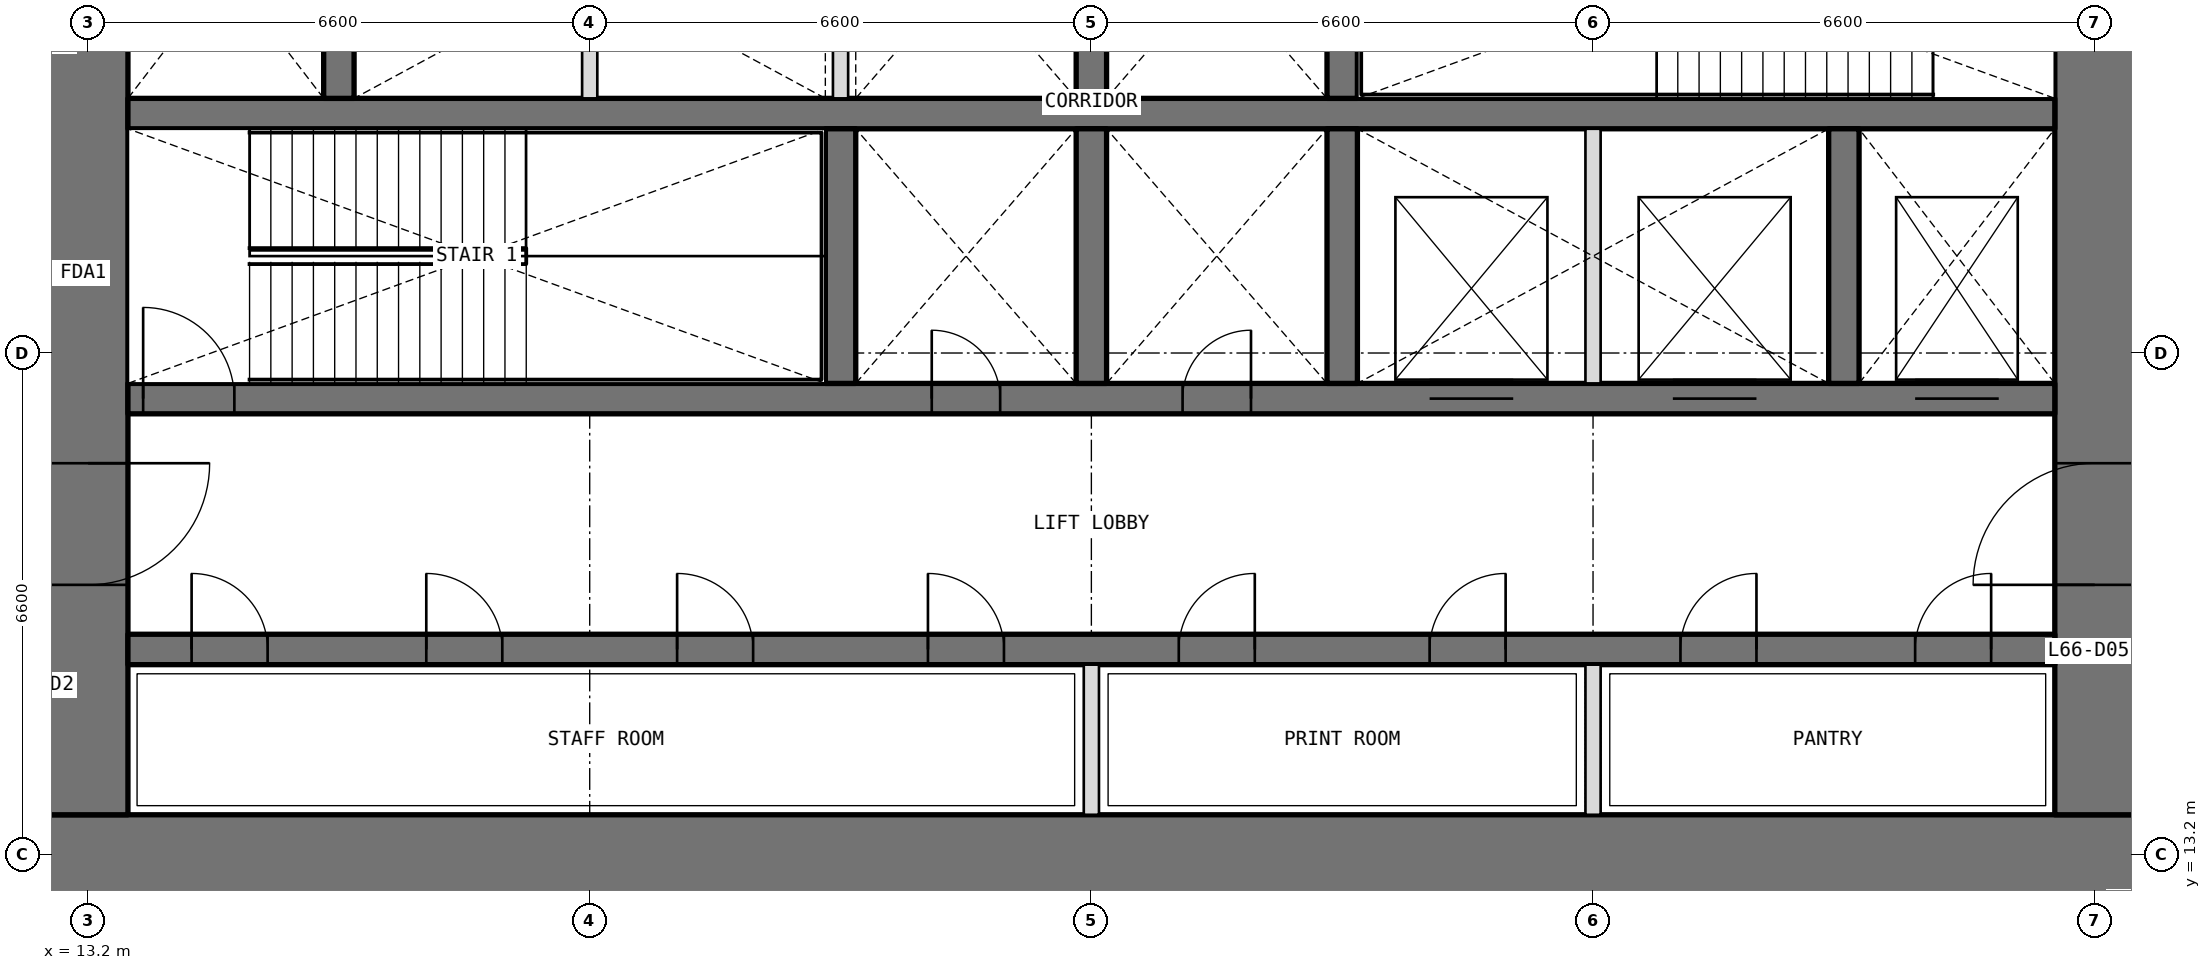
"""IFC4 building model, lengths in metres.
Left out: names, types, materials, properties, quantities, classifications, styles, units other than length and angle.
Written with IfcOpenShell. Run it as: python <this file> out.ifc"""

import sys

from ifc_helpers import new_model, si_unit, direction, frame, frame_2d, origin, place, context, subcontext, project, spatial, rectangle, extrude, element, fill, save


model = new_model("IFC4")
c1 = context("Model", 3, precision=1e-05, world=origin(), true_north=direction((0.0, 1.0)))
c2 = subcontext(c1, "Body", "Model", "MODEL_VIEW")
j1 = project(units=[si_unit("LENGTHUNIT", "METRE"), si_unit("PLANEANGLEUNIT", "RADIAN")], contexts=[c1])
p1 = place(None, origin())
s1 = spatial("IfcSite", under=j1, at=p1, CompositionType="ELEMENT")
p2 = place(p1, origin())
s2 = spatial("IfcBuilding", under=s1, at=p2, CompositionType="ELEMENT")
p3 = place(p2, frame((0.0, 0.0, 288.0)))
s3 = spatial("IfcBuildingStorey", under=s2, at=p3, CompositionType="ELEMENT", Elevation=288.0)
p4 = place(p3, frame((12.675, 13.2, 0.0), z_axis=(0.0, 0.0, 1.0), x_axis=(1.0, 0.0, 0.0)))
e1 = element("IfcWall", 1, at=p4, inside=s3, PredefinedType="SHEAR", context=c2, shape_type="SweptSolid", body=[
    extrude(rectangle(XDim=27.45, YDim=1.05, at=frame_2d((13.725, 0.0))), origin(), (0.0, 0.0, 1.0), 4.8),
])
p5 = place(p3, frame((39.6, 13.725, 0.0), z_axis=(0.0, 0.0, 1.0), x_axis=(0.0, 1.0, 0.0)))
e2 = element("IfcWall", 2, at=p5, inside=s3, PredefinedType="SHEAR", context=c2, shape_type="SweptSolid", body=[
    extrude(rectangle(XDim=18.75, YDim=1.05, at=frame_2d((9.375, 0.0))), origin(), (0.0, 0.0, 1.0), 4.8),
])
p6 = place(p5, frame((3.025, 0.0, 0.0)))
e3 = element("IfcOpeningElement", 3, at=p6, cuts=e2, PredefinedType="OPENING", context=c2, shape_type="SweptSolid", body=[
    extrude(rectangle(XDim=1.6, YDim=2.1, at=frame_2d((0.8, 1.05))), frame((0.0, 0.535, 0.0), z_axis=(0.0, -1.0, 0.0), x_axis=(1.0, 0.0, 0.0)), (0.0, 0.0, 1.0), 1.07),
])
p7 = place(p5, frame((13.825, 0.0, 0.0)))
e4 = element("IfcOpeningElement", 4, at=p7, cuts=e2, PredefinedType="OPENING", context=c2, shape_type="SweptSolid", body=[
    extrude(rectangle(XDim=1.6, YDim=2.1, at=frame_2d((0.8, 1.05))), frame((0.0, 0.535, 0.0), z_axis=(0.0, -1.0, 0.0), x_axis=(1.0, 0.0, 0.0)), (0.0, 0.0, 1.0), 1.07),
])
p8 = place(p3, frame((13.2, 32.475, 0.0), z_axis=(0.0, 0.0, 1.0), x_axis=(0.0, -1.0, 0.0)))
e5 = element("IfcWall", 5, at=p8, inside=s3, PredefinedType="SHEAR", context=c2, shape_type="SweptSolid", body=[
    extrude(rectangle(XDim=18.75, YDim=1.05, at=frame_2d((9.375, 0.0))), origin(), (0.0, 0.0, 1.0), 4.8),
])
p9 = place(p8, frame((14.125, 0.0, 0.0)))
e6 = element("IfcOpeningElement", 6, at=p9, cuts=e5, PredefinedType="OPENING", context=c2, shape_type="SweptSolid", body=[
    extrude(rectangle(XDim=1.6, YDim=2.1, at=frame_2d((0.8, 1.05))), frame((0.0, 0.535, 0.0), z_axis=(0.0, -1.0, 0.0), x_axis=(1.0, 0.0, 0.0)), (0.0, 0.0, 1.0), 1.07),
])
p10 = place(p8, frame((3.325, 0.0, 0.0)))
e7 = element("IfcOpeningElement", 7, at=p10, cuts=e5, PredefinedType="OPENING", context=c2, shape_type="SweptSolid", body=[
    extrude(rectangle(XDim=1.6, YDim=2.1, at=frame_2d((0.8, 1.05))), frame((0.0, 0.535, 0.0), z_axis=(0.0, -1.0, 0.0), x_axis=(1.0, 0.0, 0.0)), (0.0, 0.0, 1.0), 1.07),
])
p11 = place(p3, frame((13.725, 15.9, 0.0), z_axis=(0.0, 0.0, 1.0), x_axis=(1.0, 0.0, 0.0)))
e8 = element("IfcWall", 8, at=p11, inside=s3, PredefinedType="SHEAR", context=c2, shape_type="SweptSolid", body=[
    extrude(rectangle(XDim=25.35, YDim=0.4, at=frame_2d((12.675, 0.0))), origin(), (0.0, 0.0, 1.0), 4.8),
])
p12 = place(p11, frame((0.837, 0.0, 0.0)))
e9 = element("IfcOpeningElement", 9, at=p12, cuts=e8, PredefinedType="OPENING", context=c2, shape_type="SweptSolid", body=[
    extrude(rectangle(XDim=1.0, YDim=2.1, at=frame_2d((0.5, 1.05))), frame((0.0, 0.21, 0.0), z_axis=(0.0, -1.0, 0.0), x_axis=(1.0, 0.0, 0.0)), (0.0, 0.0, 1.0), 0.42),
])
p13 = place(p11, frame((3.925, 0.0, 0.0)))
e10 = element("IfcOpeningElement", 10, at=p13, cuts=e8, PredefinedType="OPENING", context=c2, shape_type="SweptSolid", body=[
    extrude(rectangle(XDim=1.0, YDim=2.1, at=frame_2d((0.5, 1.05))), frame((0.0, 0.21, 0.0), z_axis=(0.0, -1.0, 0.0), x_axis=(1.0, 0.0, 0.0)), (0.0, 0.0, 1.0), 0.42),
])
p14 = place(p11, frame((7.225, 0.0, 0.0)))
e11 = element("IfcOpeningElement", 11, at=p14, cuts=e8, PredefinedType="OPENING", context=c2, shape_type="SweptSolid", body=[
    extrude(rectangle(XDim=1.0, YDim=2.1, at=frame_2d((0.5, 1.05))), frame((0.0, 0.21, 0.0), z_axis=(0.0, -1.0, 0.0), x_axis=(1.0, 0.0, 0.0)), (0.0, 0.0, 1.0), 0.42),
])
p15 = place(p11, frame((10.525, 0.0, 0.0)))
e12 = element("IfcOpeningElement", 12, at=p15, cuts=e8, PredefinedType="OPENING", context=c2, shape_type="SweptSolid", body=[
    extrude(rectangle(XDim=1.0, YDim=2.1, at=frame_2d((0.5, 1.05))), frame((0.0, 0.21, 0.0), z_axis=(0.0, -1.0, 0.0), x_axis=(1.0, 0.0, 0.0)), (0.0, 0.0, 1.0), 0.42),
])
p16 = place(p11, frame((13.825, 0.0, 0.0)))
e13 = element("IfcOpeningElement", 13, at=p16, cuts=e8, PredefinedType="OPENING", context=c2, shape_type="SweptSolid", body=[
    extrude(rectangle(XDim=1.0, YDim=2.1, at=frame_2d((0.5, 1.05))), frame((0.0, 0.21, 0.0), z_axis=(0.0, -1.0, 0.0), x_axis=(1.0, 0.0, 0.0)), (0.0, 0.0, 1.0), 0.42),
])
p17 = place(p11, frame((17.125, 0.0, 0.0)))
e14 = element("IfcOpeningElement", 14, at=p17, cuts=e8, PredefinedType="OPENING", context=c2, shape_type="SweptSolid", body=[
    extrude(rectangle(XDim=1.0, YDim=2.1, at=frame_2d((0.5, 1.05))), frame((0.0, 0.21, 0.0), z_axis=(0.0, -1.0, 0.0), x_axis=(1.0, 0.0, 0.0)), (0.0, 0.0, 1.0), 0.42),
])
p18 = place(p11, frame((20.425, 0.0, 0.0)))
e15 = element("IfcOpeningElement", 15, at=p18, cuts=e8, PredefinedType="OPENING", context=c2, shape_type="SweptSolid", body=[
    extrude(rectangle(XDim=1.0, YDim=2.1, at=frame_2d((0.5, 1.05))), frame((0.0, 0.21, 0.0), z_axis=(0.0, -1.0, 0.0), x_axis=(1.0, 0.0, 0.0)), (0.0, 0.0, 1.0), 0.42),
])
p19 = place(p11, frame((23.512, 0.0, 0.0)))
e16 = element("IfcOpeningElement", 16, at=p19, cuts=e8, PredefinedType="OPENING", context=c2, shape_type="SweptSolid", body=[
    extrude(rectangle(XDim=1.0, YDim=2.1, at=frame_2d((0.5, 1.05))), frame((0.0, 0.21, 0.0), z_axis=(0.0, -1.0, 0.0), x_axis=(1.0, 0.0, 0.0)), (0.0, 0.0, 1.0), 0.42),
])
p20 = place(p3, frame((13.725, 19.2, 0.0), z_axis=(0.0, 0.0, 1.0), x_axis=(1.0, 0.0, 0.0)))
e17 = element("IfcWall", 17, at=p20, inside=s3, PredefinedType="SHEAR", context=c2, shape_type="SweptSolid", body=[
    extrude(rectangle(XDim=25.35, YDim=0.4, at=frame_2d((12.675, 0.0))), origin(), (0.0, 0.0, 1.0), 4.8),
])
p21 = place(p20, frame((10.575, 0.0, 0.0)))
e18 = element("IfcOpeningElement", 18, at=p21, cuts=e17, PredefinedType="OPENING", context=c2, shape_type="SweptSolid", body=[
    extrude(rectangle(XDim=0.9, YDim=2.1, at=frame_2d((0.45, 1.05))), frame((0.0, 0.21, 0.0), z_axis=(0.0, -1.0, 0.0), x_axis=(1.0, 0.0, 0.0)), (0.0, 0.0, 1.0), 0.42),
])
p22 = place(p20, frame((13.875, 0.0, 0.0)))
e19 = element("IfcOpeningElement", 19, at=p22, cuts=e17, PredefinedType="OPENING", context=c2, shape_type="SweptSolid", body=[
    extrude(rectangle(XDim=0.9, YDim=2.1, at=frame_2d((0.45, 1.05))), frame((0.0, 0.21, 0.0), z_axis=(0.0, -1.0, 0.0), x_axis=(1.0, 0.0, 0.0)), (0.0, 0.0, 1.0), 0.42),
])
p23 = place(p20, frame((0.2, 0.0, 0.0)))
e20 = element("IfcOpeningElement", 20, at=p23, cuts=e17, PredefinedType="OPENING", context=c2, shape_type="SweptSolid", body=[
    extrude(rectangle(XDim=1.2, YDim=2.1, at=frame_2d((0.6, 1.05))), frame((0.0, 0.21, 0.0), z_axis=(0.0, -1.0, 0.0), x_axis=(1.0, 0.0, 0.0)), (0.0, 0.0, 1.0), 0.42),
])
p24 = place(p20, frame((23.512, 0.0, 0.0)))
e21 = element("IfcOpeningElement", 21, at=p24, cuts=e17, PredefinedType="OPENING", context=c2, shape_type="SweptSolid", body=[
    extrude(rectangle(XDim=1.1, YDim=2.1, at=frame_2d((0.55, 1.05))), frame((0.0, 0.21, 0.0), z_axis=(0.0, -1.0, 0.0), x_axis=(1.0, 0.0, 0.0)), (0.0, 0.0, 1.0), 0.42),
])
p25 = place(p20, frame((17.125, 0.0, 0.0)))
e22 = element("IfcOpeningElement", 22, at=p25, cuts=e17, PredefinedType="OPENING", context=c2, shape_type="SweptSolid", body=[
    extrude(rectangle(XDim=1.1, YDim=2.1, at=frame_2d((0.55, 1.05))), frame((0.0, 0.21, 0.0), z_axis=(0.0, -1.0, 0.0), x_axis=(1.0, 0.0, 0.0)), (0.0, 0.0, 1.0), 0.42),
])
p26 = place(p20, frame((20.325, 0.0, 0.0)))
e23 = element("IfcOpeningElement", 23, at=p26, cuts=e17, PredefinedType="OPENING", context=c2, shape_type="SweptSolid", body=[
    extrude(rectangle(XDim=1.1, YDim=2.1, at=frame_2d((0.55, 1.05))), frame((0.0, 0.21, 0.0), z_axis=(0.0, -1.0, 0.0), x_axis=(1.0, 0.0, 0.0)), (0.0, 0.0, 1.0), 0.42),
])
p27 = place(p3, frame((13.725, 22.95, 0.0), z_axis=(0.0, 0.0, 1.0), x_axis=(1.0, 0.0, 0.0)))
e24 = element("IfcWall", 24, at=p27, inside=s3, PredefinedType="SHEAR", context=c2, shape_type="SweptSolid", body=[
    extrude(rectangle(XDim=25.35, YDim=0.4, at=frame_2d((12.675, 0.0))), origin(), (0.0, 0.0, 1.0), 4.8),
])
for number, where, z_axis, x_axis in (
    (25, (23.1, 19.4, 0.0), (0.0, 0.0, 1.0), (0.0, 1.0, 0.0)),
    (26, (26.4, 19.4, 0.0), (0.0, 0.0, 1.0), (0.0, 1.0, 0.0)),
    (27, (29.7, 19.4, 0.0), (0.0, 0.0, 1.0), (0.0, 1.0, 0.0)),
    (28, (36.3, 19.4, 0.0), (0.0, 0.0, 1.0), (0.0, 1.0, 0.0)),
    (29, (16.5, 23.15, 0.0), (0.0, 0.0, 1.0), (0.0, 1.0, 0.0)),
    (30, (26.4, 23.15, 0.0), (0.0, 0.0, 1.0), (0.0, 1.0, 0.0)),
    (31, (29.7, 23.15, 0.0), (0.0, 0.0, 1.0), (0.0, 1.0, 0.0)),
):
    element("IfcWall", number, at=place(p3, frame(where, z_axis=z_axis, x_axis=x_axis)), inside=s3, PredefinedType="SHEAR", context=c2, shape_type="SweptSolid", body=[
        extrude(rectangle(XDim=3.35, YDim=0.4, at=frame_2d((1.675, 0.0))), origin(), (0.0, 0.0, 1.0), 4.8),
    ])
for number, where, z_axis, x_axis in (
    (32, (26.4, 13.725, 0.0), (0.0, 0.0, 1.0), (0.0, 1.0, 0.0)),
    (33, (33.0, 13.725, 0.0), (0.0, 0.0, 1.0), (0.0, 1.0, 0.0)),
):
    element("IfcWall", number, at=place(p3, frame(where, z_axis=z_axis, x_axis=x_axis)), inside=s3, PredefinedType="PARTITIONING", context=c2, shape_type="SweptSolid", body=[
        extrude(rectangle(XDim=1.975, YDim=0.2, at=frame_2d((0.987, 0.0))), origin(), (0.0, 0.0, 1.0), 4.8),
    ])
for number, where, z_axis, x_axis in (
    (34, (33.0, 19.4, 0.0), (0.0, 0.0, 1.0), (0.0, 1.0, 0.0)),
    (35, (19.8, 23.15, 0.0), (0.0, 0.0, 1.0), (0.0, 1.0, 0.0)),
    (36, (23.1, 23.15, 0.0), (0.0, 0.0, 1.0), (0.0, 1.0, 0.0)),
):
    element("IfcWall", number, at=place(p3, frame(where, z_axis=z_axis, x_axis=x_axis)), inside=s3, PredefinedType="PARTITIONING", context=c2, shape_type="SweptSolid", body=[
        extrude(rectangle(XDim=3.35, YDim=0.2, at=frame_2d((1.675, 0.0))), origin(), (0.0, 0.0, 1.0), 4.8),
    ])
p28 = place(p21, origin())
e37 = element("IfcDoor", 37, at=p28, inside=s3, OperationType="SINGLE_SWING_LEFT", PredefinedType="DOOR", context=c2, shape_type="SweptSolid", body=[
    extrude(rectangle(XDim=0.9, YDim=2.1, at=frame_2d((0.45, 1.05))), frame((0.0, 0.025, 0.0), z_axis=(0.0, -1.0, 0.0), x_axis=(1.0, 0.0, 0.0)), (0.0, 0.0, 1.0), 0.05),
])
fill(e18, e37)
p29 = place(p22, origin())
e38 = element("IfcDoor", 38, at=p29, inside=s3, OperationType="SINGLE_SWING_RIGHT", PredefinedType="DOOR", context=c2, shape_type="SweptSolid", body=[
    extrude(rectangle(XDim=0.9, YDim=2.1, at=frame_2d((0.45, 1.05))), frame((0.0, 0.025, 0.0), z_axis=(0.0, -1.0, 0.0), x_axis=(1.0, 0.0, 0.0)), (0.0, 0.0, 1.0), 0.05),
])
fill(e19, e38)
p30 = place(p12, origin())
e39 = element("IfcDoor", 39, at=p30, inside=s3, OperationType="SINGLE_SWING_LEFT", PredefinedType="DOOR", context=c2, shape_type="SweptSolid", body=[
    extrude(rectangle(XDim=1.0, YDim=2.1, at=frame_2d((0.5, 1.05))), frame((0.0, 0.025, 0.0), z_axis=(0.0, -1.0, 0.0), x_axis=(1.0, 0.0, 0.0)), (0.0, 0.0, 1.0), 0.05),
])
fill(e9, e39)
p31 = place(p13, origin())
e40 = element("IfcDoor", 40, at=p31, inside=s3, OperationType="SINGLE_SWING_LEFT", PredefinedType="DOOR", context=c2, shape_type="SweptSolid", body=[
    extrude(rectangle(XDim=1.0, YDim=2.1, at=frame_2d((0.5, 1.05))), frame((0.0, 0.025, 0.0), z_axis=(0.0, -1.0, 0.0), x_axis=(1.0, 0.0, 0.0)), (0.0, 0.0, 1.0), 0.05),
])
fill(e10, e40)
p32 = place(p14, origin())
e41 = element("IfcDoor", 41, at=p32, inside=s3, OperationType="SINGLE_SWING_LEFT", PredefinedType="DOOR", context=c2, shape_type="SweptSolid", body=[
    extrude(rectangle(XDim=1.0, YDim=2.1, at=frame_2d((0.5, 1.05))), frame((0.0, 0.025, 0.0), z_axis=(0.0, -1.0, 0.0), x_axis=(1.0, 0.0, 0.0)), (0.0, 0.0, 1.0), 0.05),
])
fill(e11, e41)
p33 = place(p15, origin())
e42 = element("IfcDoor", 42, at=p33, inside=s3, OperationType="SINGLE_SWING_LEFT", PredefinedType="DOOR", context=c2, shape_type="SweptSolid", body=[
    extrude(rectangle(XDim=1.0, YDim=2.1, at=frame_2d((0.5, 1.05))), frame((0.0, 0.025, 0.0), z_axis=(0.0, -1.0, 0.0), x_axis=(1.0, 0.0, 0.0)), (0.0, 0.0, 1.0), 0.05),
])
fill(e12, e42)
p34 = place(p16, origin())
e43 = element("IfcDoor", 43, at=p34, inside=s3, OperationType="SINGLE_SWING_RIGHT", PredefinedType="DOOR", context=c2, shape_type="SweptSolid", body=[
    extrude(rectangle(XDim=1.0, YDim=2.1, at=frame_2d((0.5, 1.05))), frame((0.0, 0.025, 0.0), z_axis=(0.0, -1.0, 0.0), x_axis=(1.0, 0.0, 0.0)), (0.0, 0.0, 1.0), 0.05),
])
fill(e13, e43)
p35 = place(p17, origin())
e44 = element("IfcDoor", 44, at=p35, inside=s3, OperationType="SINGLE_SWING_RIGHT", PredefinedType="DOOR", context=c2, shape_type="SweptSolid", body=[
    extrude(rectangle(XDim=1.0, YDim=2.1, at=frame_2d((0.5, 1.05))), frame((0.0, 0.025, 0.0), z_axis=(0.0, -1.0, 0.0), x_axis=(1.0, 0.0, 0.0)), (0.0, 0.0, 1.0), 0.05),
])
fill(e14, e44)
p36 = place(p18, origin())
e45 = element("IfcDoor", 45, at=p36, inside=s3, OperationType="SINGLE_SWING_RIGHT", PredefinedType="DOOR", context=c2, shape_type="SweptSolid", body=[
    extrude(rectangle(XDim=1.0, YDim=2.1, at=frame_2d((0.5, 1.05))), frame((0.0, 0.025, 0.0), z_axis=(0.0, -1.0, 0.0), x_axis=(1.0, 0.0, 0.0)), (0.0, 0.0, 1.0), 0.05),
])
fill(e15, e45)
p37 = place(p19, origin())
e46 = element("IfcDoor", 46, at=p37, inside=s3, OperationType="SINGLE_SWING_RIGHT", PredefinedType="DOOR", context=c2, shape_type="SweptSolid", body=[
    extrude(rectangle(XDim=1.0, YDim=2.1, at=frame_2d((0.5, 1.05))), frame((0.0, 0.025, 0.0), z_axis=(0.0, -1.0, 0.0), x_axis=(1.0, 0.0, 0.0)), (0.0, 0.0, 1.0), 0.05),
])
fill(e16, e46)
p38 = place(p23, origin())
e47 = element("IfcDoor", 47, at=p38, inside=s3, OperationType="SINGLE_SWING_LEFT", PredefinedType="DOOR", context=c2, shape_type="SweptSolid", body=[
    extrude(rectangle(XDim=1.2, YDim=2.1, at=frame_2d((0.6, 1.05))), frame((0.0, 0.025, 0.0), z_axis=(0.0, -1.0, 0.0), x_axis=(1.0, 0.0, 0.0)), (0.0, 0.0, 1.0), 0.05),
])
fill(e20, e47)
p39 = place(p9, origin())
e48 = element("IfcDoor", 48, at=p39, inside=s3, OperationType="DOUBLE_DOOR_DOUBLE_SWING", PredefinedType="DOOR", context=c2, shape_type="SweptSolid", body=[
    extrude(rectangle(XDim=1.6, YDim=2.1, at=frame_2d((0.8, 1.05))), frame((0.0, 0.025, 0.0), z_axis=(0.0, -1.0, 0.0), x_axis=(1.0, 0.0, 0.0)), (0.0, 0.0, 1.0), 0.05),
])
fill(e6, e48)
p40 = place(p6, origin())
e49 = element("IfcDoor", 49, at=p40, inside=s3, OperationType="DOUBLE_DOOR_DOUBLE_SWING", PredefinedType="DOOR", context=c2, shape_type="SweptSolid", body=[
    extrude(rectangle(XDim=1.6, YDim=2.1, at=frame_2d((0.8, 1.05))), frame((0.0, 0.025, 0.0), z_axis=(0.0, -1.0, 0.0), x_axis=(1.0, 0.0, 0.0)), (0.0, 0.0, 1.0), 0.05),
])
fill(e3, e49)
p41 = place(p24, origin())
e50 = element("IfcDoor", 50, at=p41, inside=s3, OperationType="DOUBLE_DOOR_SLIDING", PredefinedType="DOOR", context=c2, shape_type="SweptSolid", body=[
    extrude(rectangle(XDim=1.1, YDim=2.1, at=frame_2d((0.55, 1.05))), frame((0.0, 0.025, 0.0), z_axis=(0.0, -1.0, 0.0), x_axis=(1.0, 0.0, 0.0)), (0.0, 0.0, 1.0), 0.05),
])
fill(e21, e50)
p42 = place(p25, origin())
e51 = element("IfcDoor", 51, at=p42, inside=s3, OperationType="DOUBLE_DOOR_SLIDING", PredefinedType="DOOR", context=c2, shape_type="SweptSolid", body=[
    extrude(rectangle(XDim=1.1, YDim=2.1, at=frame_2d((0.55, 1.05))), frame((0.0, 0.025, 0.0), z_axis=(0.0, -1.0, 0.0), x_axis=(1.0, 0.0, 0.0)), (0.0, 0.0, 1.0), 0.05),
])
fill(e22, e51)
p43 = place(p26, origin())
e52 = element("IfcDoor", 52, at=p43, inside=s3, OperationType="DOUBLE_DOOR_SLIDING", PredefinedType="DOOR", context=c2, shape_type="SweptSolid", body=[
    extrude(rectangle(XDim=1.1, YDim=2.1, at=frame_2d((0.55, 1.05))), frame((0.0, 0.025, 0.0), z_axis=(0.0, -1.0, 0.0), x_axis=(1.0, 0.0, 0.0)), (0.0, 0.0, 1.0), 0.05),
])
fill(e23, e52)
save(model, sys.argv[1])
